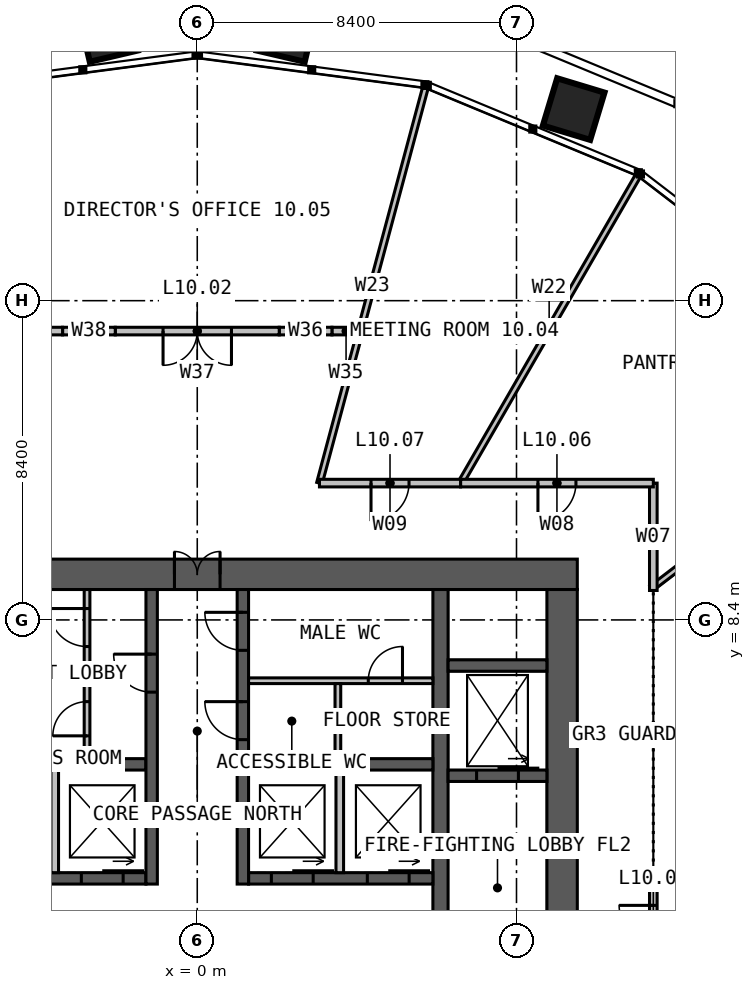
"""IFC4 building model, lengths in metres.
Left out: names, types, materials, properties, quantities, classifications, styles, units other than length and angle.
Written with IfcOpenShell. Run it as: python <this file> out.ifc"""

import sys

from ifc_helpers import new_model, si_unit, direction, frame, frame_2d, origin, place, context, subcontext, project, spatial, rectangle, extrude, element, fill, save


model = new_model("IFC4")
c1 = context("Model", 3, precision=1e-05, world=origin(), true_north=direction((0.0, 1.0)))
c2 = subcontext(c1, "Body", "Model", "MODEL_VIEW")
j1 = project(units=[si_unit("LENGTHUNIT", "METRE"), si_unit("PLANEANGLEUNIT", "RADIAN")], contexts=[c1])
p1 = place(None, origin())
s1 = spatial("IfcSite", under=j1, at=p1, CompositionType="ELEMENT")
p2 = place(p1, origin())
s2 = spatial("IfcBuilding", under=s1, at=p2, CompositionType="ELEMENT")
p3 = place(p2, frame((0.0, 0.0, 45.0)))
s3 = spatial("IfcBuildingStorey", under=s2, at=p3, CompositionType="ELEMENT", Elevation=45.0)
p4 = place(p3, frame((-10.0, 9.6, 0.0), z_axis=(0.0, 0.0, 1.0), x_axis=(1.0, 0.0, 0.0)))
e1 = element("IfcWall", 1, at=p4, inside=s3, PredefinedType="SOLIDWALL", context=c2, shape_type="SweptSolid", body=[
    extrude(rectangle(XDim=20.0, YDim=0.8, at=frame_2d((10.0, 0.0))), origin(), (0.0, 0.0, 1.0), 4.0),
])
p5 = place(p4, frame((9.4, 0.0, 0.0)))
e2 = element("IfcOpeningElement", 2, at=p5, cuts=e1, PredefinedType="OPENING", context=c2, shape_type="SweptSolid", body=[
    extrude(rectangle(XDim=1.2, YDim=2.2, at=frame_2d((0.6, 1.1))), frame((0.0, 0.41, 0.0), z_axis=(0.0, -1.0, 0.0), x_axis=(1.0, 0.0, 0.0)), (0.0, 0.0, 1.0), 0.82),
])
p6 = place(p3, frame((9.6, -9.2, 0.0), z_axis=(0.0, 0.0, 1.0), x_axis=(0.0, 1.0, 0.0)))
e3 = element("IfcWall", 3, at=p6, inside=s3, PredefinedType="SOLIDWALL", context=c2, shape_type="SweptSolid", body=[
    extrude(rectangle(XDim=18.4, YDim=0.8, at=frame_2d((9.2, 0.0))), origin(), (0.0, 0.0, 1.0), 4.0),
])
p7 = place(p3, frame((6.4, 9.2, 0.0), z_axis=(0.0, 0.0, 1.0), x_axis=(0.0, -1.0, 0.0)))
e4 = element("IfcWall", 4, at=p7, inside=s3, PredefinedType="SOLIDWALL", context=c2, shape_type="SweptSolid", body=[
    extrude(rectangle(XDim=18.4, YDim=0.4, at=frame_2d((9.2, 0.0))), origin(), (0.0, 0.0, 1.0), 4.0),
])
p8 = place(p7, frame((8.7, 0.0, 0.0)))
e5 = element("IfcOpeningElement", 5, at=p8, cuts=e4, PredefinedType="OPENING", context=c2, shape_type="SweptSolid", body=[
    extrude(rectangle(XDim=1.0, YDim=2.2, at=frame_2d((0.5, 1.1))), frame((0.0, 0.21, 0.0), z_axis=(0.0, -1.0, 0.0), x_axis=(1.0, 0.0, 0.0)), (0.0, 0.0, 1.0), 0.42),
])
p9 = place(p3, frame((-6.2, 1.6, 0.0), z_axis=(0.0, 0.0, 1.0), x_axis=(1.0, 0.0, 0.0)))
e6 = element("IfcWall", 6, at=p9, inside=s3, PredefinedType="SOLIDWALL", context=c2, shape_type="SweptSolid", body=[
    extrude(rectangle(XDim=4.85, YDim=0.3, at=frame_2d((2.425, 0.0))), origin(), (0.0, 0.0, 1.0), 4.0),
])
p10 = place(p9, frame((0.625, 0.0, 0.0)))
e7 = element("IfcOpeningElement", 7, at=p10, cuts=e6, PredefinedType="OPENING", context=c2, shape_type="SweptSolid", body=[
    extrude(rectangle(XDim=1.1, YDim=2.2, at=frame_2d((0.55, 1.1))), frame((0.0, 0.16, 0.0), z_axis=(0.0, -1.0, 0.0), x_axis=(1.0, 0.0, 0.0)), (0.0, 0.0, 1.0), 0.32),
])
p11 = place(p9, frame((3.15, 0.0, 0.0)))
e8 = element("IfcOpeningElement", 8, at=p11, cuts=e6, PredefinedType="OPENING", context=c2, shape_type="SweptSolid", body=[
    extrude(rectangle(XDim=1.1, YDim=2.2, at=frame_2d((0.55, 1.1))), frame((0.0, 0.16, 0.0), z_axis=(0.0, -1.0, 0.0), x_axis=(1.0, 0.0, 0.0)), (0.0, 0.0, 1.0), 0.32),
])
p12 = place(p3, frame((1.35, 1.6, 0.0), z_axis=(0.0, 0.0, 1.0), x_axis=(1.0, 0.0, 0.0)))
e9 = element("IfcWall", 9, at=p12, inside=s3, PredefinedType="SOLIDWALL", context=c2, shape_type="SweptSolid", body=[
    extrude(rectangle(XDim=4.85, YDim=0.3, at=frame_2d((2.425, 0.0))), origin(), (0.0, 0.0, 1.0), 4.0),
])
p13 = place(p12, frame((0.6, 0.0, 0.0)))
e10 = element("IfcOpeningElement", 10, at=p13, cuts=e9, PredefinedType="OPENING", context=c2, shape_type="SweptSolid", body=[
    extrude(rectangle(XDim=1.1, YDim=2.2, at=frame_2d((0.55, 1.1))), frame((0.0, 0.16, 0.0), z_axis=(0.0, -1.0, 0.0), x_axis=(1.0, 0.0, 0.0)), (0.0, 0.0, 1.0), 0.32),
])
p14 = place(p12, frame((3.125, 0.0, 0.0)))
e11 = element("IfcOpeningElement", 11, at=p14, cuts=e9, PredefinedType="OPENING", context=c2, shape_type="SweptSolid", body=[
    extrude(rectangle(XDim=1.1, YDim=2.2, at=frame_2d((0.55, 1.1))), frame((0.0, 0.16, 0.0), z_axis=(0.0, -1.0, 0.0), x_axis=(1.0, 0.0, 0.0)), (0.0, 0.0, 1.0), 0.32),
])
for number, where, z_axis, x_axis in (
    (12, (-6.2, 4.6, 0.0), (0.0, 0.0, 1.0), (1.0, 0.0, 0.0)),
    (13, (1.35, 4.6, 0.0), (0.0, 0.0, 1.0), (1.0, 0.0, 0.0)),
):
    element("IfcWall", number, at=place(p3, frame(where, z_axis=z_axis, x_axis=x_axis)), inside=s3, PredefinedType="SOLIDWALL", context=c2, shape_type="SweptSolid", body=[
        extrude(rectangle(XDim=4.85, YDim=0.3, at=frame_2d((2.425, 0.0))), origin(), (0.0, 0.0, 1.0), 4.0),
    ])
p15 = place(p3, frame((-1.2, 1.45, 0.0), z_axis=(0.0, 0.0, 1.0), x_axis=(0.0, 1.0, 0.0)))
e14 = element("IfcWall", 14, at=p15, inside=s3, PredefinedType="SOLIDWALL", context=c2, shape_type="SweptSolid", body=[
    extrude(rectangle(XDim=7.75, YDim=0.3, at=frame_2d((3.875, 0.0))), origin(), (0.0, 0.0, 1.0), 4.0),
])
p16 = place(p15, frame((5.05, 0.0, 0.0)))
e15 = element("IfcOpeningElement", 15, at=p16, cuts=e14, PredefinedType="OPENING", context=c2, shape_type="SweptSolid", body=[
    extrude(rectangle(XDim=1.0, YDim=2.2, at=frame_2d((0.5, 1.1))), frame((0.0, 0.16, 0.0), z_axis=(0.0, -1.0, 0.0), x_axis=(1.0, 0.0, 0.0)), (0.0, 0.0, 1.0), 0.32),
])
p17 = place(p3, frame((1.2, 1.45, 0.0), z_axis=(0.0, 0.0, 1.0), x_axis=(0.0, 1.0, 0.0)))
e16 = element("IfcWall", 16, at=p17, inside=s3, PredefinedType="SOLIDWALL", context=c2, shape_type="SweptSolid", body=[
    extrude(rectangle(XDim=7.75, YDim=0.3, at=frame_2d((3.875, 0.0))), origin(), (0.0, 0.0, 1.0), 4.0),
])
p18 = place(p17, frame((3.8, 0.0, 0.0)))
e17 = element("IfcOpeningElement", 17, at=p18, cuts=e16, PredefinedType="OPENING", context=c2, shape_type="SweptSolid", body=[
    extrude(rectangle(XDim=1.0, YDim=2.2, at=frame_2d((0.5, 1.1))), frame((0.0, 0.16, 0.0), z_axis=(0.0, -1.0, 0.0), x_axis=(1.0, 0.0, 0.0)), (0.0, 0.0, 1.0), 0.32),
])
p19 = place(p17, frame((6.15, 0.0, 0.0)))
e18 = element("IfcOpeningElement", 18, at=p19, cuts=e16, PredefinedType="OPENING", context=c2, shape_type="SweptSolid", body=[
    extrude(rectangle(XDim=1.0, YDim=2.2, at=frame_2d((0.5, 1.1))), frame((0.0, 0.16, 0.0), z_axis=(0.0, -1.0, 0.0), x_axis=(1.0, 0.0, 0.0)), (0.0, 0.0, 1.0), 0.32),
])
p20 = place(p3, frame((6.6, 4.3, 0.0), z_axis=(0.0, 0.0, 1.0), x_axis=(1.0, 0.0, 0.0)))
e19 = element("IfcWall", 19, at=p20, inside=s3, PredefinedType="SOLIDWALL", context=c2, shape_type="SweptSolid", body=[
    extrude(rectangle(XDim=2.6, YDim=0.3, at=frame_2d((1.3, 0.0))), origin(), (0.0, 0.0, 1.0), 4.0),
])
p21 = place(p20, frame((0.75, 0.0, 0.0)))
e20 = element("IfcOpeningElement", 20, at=p21, cuts=e19, PredefinedType="OPENING", context=c2, shape_type="SweptSolid", body=[
    extrude(rectangle(XDim=1.1, YDim=2.2, at=frame_2d((0.55, 1.1))), frame((0.0, 0.16, 0.0), z_axis=(0.0, -1.0, 0.0), x_axis=(1.0, 0.0, 0.0)), (0.0, 0.0, 1.0), 0.32),
])
p22 = place(p3, frame((6.6, 7.2, 0.0), z_axis=(0.0, 0.0, 1.0), x_axis=(1.0, 0.0, 0.0)))
e21 = element("IfcWall", 21, at=p22, inside=s3, PredefinedType="SOLIDWALL", context=c2, shape_type="SweptSolid", body=[
    extrude(rectangle(XDim=2.6, YDim=0.3, at=frame_2d((1.3, 0.0))), origin(), (0.0, 0.0, 1.0), 4.0),
])
for number, where, z_axis, x_axis in (
    (22, (-3.75, 1.75, 0.0), (0.0, 0.0, 1.0), (0.0, 1.0, 0.0)),
    (23, (3.75, 1.75, 0.0), (0.0, 0.0, 1.0), (0.0, 1.0, 0.0)),
):
    element("IfcWall", number, at=place(p3, frame(where, z_axis=z_axis, x_axis=x_axis)), inside=s3, PredefinedType="SOLIDWALL", context=c2, shape_type="SweptSolid", body=[
        extrude(rectangle(XDim=2.7, YDim=0.2, at=frame_2d((1.35, 0.0))), origin(), (0.0, 0.0, 1.0), 3.75),
    ])
p23 = place(p3, frame((1.35, 6.8, 0.0), z_axis=(0.0, 0.0, 1.0), x_axis=(1.0, 0.0, 0.0)))
e24 = element("IfcWall", 24, at=p23, inside=s3, PredefinedType="PARTITIONING", context=c2, shape_type="SweptSolid", body=[
    extrude(rectangle(XDim=4.85, YDim=0.15, at=frame_2d((2.425, 0.0))), origin(), (0.0, 0.0, 1.0), 3.75),
])
p24 = place(p23, frame((3.15, 0.0, 0.0)))
e25 = element("IfcOpeningElement", 25, at=p24, cuts=e24, PredefinedType="OPENING", context=c2, shape_type="SweptSolid", body=[
    extrude(rectangle(XDim=0.9, YDim=2.2, at=frame_2d((0.45, 1.1))), frame((0.0, 0.085, 0.0), z_axis=(0.0, -1.0, 0.0), x_axis=(1.0, 0.0, 0.0)), (0.0, 0.0, 1.0), 0.17),
])
p25 = place(p3, frame((3.7, 4.75, 0.0), z_axis=(0.0, 0.0, 1.0), x_axis=(0.0, 1.0, 0.0)))
e26 = element("IfcWall", 26, at=p25, inside=s3, PredefinedType="PARTITIONING", context=c2, shape_type="SweptSolid", body=[
    extrude(rectangle(XDim=1.975, YDim=0.15, at=frame_2d((0.988, 0.0))), origin(), (0.0, 0.0, 1.0), 3.75),
])
p26 = place(p3, frame((-2.9, 4.75, 0.0), z_axis=(0.0, 0.0, 1.0), x_axis=(0.0, 1.0, 0.0)))
e27 = element("IfcWall", 27, at=p26, inside=s3, PredefinedType="PARTITIONING", context=c2, shape_type="SweptSolid", body=[
    extrude(rectangle(XDim=4.45, YDim=0.15, at=frame_2d((2.225, 0.0))), origin(), (0.0, 0.0, 1.0), 3.75),
])
p27 = place(p26, frame((2.95, 0.0, 0.0)))
e28 = element("IfcOpeningElement", 28, at=p27, cuts=e27, PredefinedType="OPENING", context=c2, shape_type="SweptSolid", body=[
    extrude(rectangle(XDim=1.0, YDim=2.2, at=frame_2d((0.5, 1.1))), frame((0.0, 0.085, 0.0), z_axis=(0.0, -1.0, 0.0), x_axis=(1.0, 0.0, 0.0)), (0.0, 0.0, 1.0), 0.17),
])
p28 = place(p26, frame((0.6, 0.0, 0.0)))
e29 = element("IfcOpeningElement", 29, at=p28, cuts=e27, PredefinedType="OPENING", context=c2, shape_type="SweptSolid", body=[
    extrude(rectangle(XDim=0.9, YDim=2.2, at=frame_2d((0.45, 1.1))), frame((0.0, 0.085, 0.0), z_axis=(0.0, -1.0, 0.0), x_axis=(1.0, 0.0, 0.0)), (0.0, 0.0, 1.0), 0.17),
])
p29 = place(p3, frame((-6.2, 7.0, 0.0), z_axis=(0.0, 0.0, 1.0), x_axis=(1.0, 0.0, 0.0)))
e30 = element("IfcWall", 30, at=p29, inside=s3, PredefinedType="PARTITIONING", context=c2, shape_type="SweptSolid", body=[
    extrude(rectangle(XDim=3.225, YDim=0.15, at=frame_2d((1.612, 0.0))), origin(), (0.0, 0.0, 1.0), 3.75),
])
p30 = place(p3, frame((12.01, 1.484, 0.0), z_axis=(0.0, 0.0, 1.0), x_axis=(0.991668835428, 0.128813511872, 0.0)))
e31 = element("IfcWall", 31, at=p30, inside=s3, PredefinedType="PARTITIONING", context=c2, shape_type="SweptSolid", body=[
    extrude(rectangle(XDim=10.881, YDim=0.15, at=frame_2d((5.44, 0.0))), origin(), (0.0, 0.0, 1.0), 2.79),
])
p31 = place(p3, frame((11.954, 9.235, 0.0), z_axis=(0.0, 0.0, 1.0), x_axis=(0.794412378412, 0.607378772288, 0.0)))
e32 = element("IfcWall", 32, at=p31, inside=s3, PredefinedType="PARTITIONING", context=c2, shape_type="SweptSolid", body=[
    extrude(rectangle(XDim=7.876, YDim=0.15, at=frame_2d((3.938, 0.0))), origin(), (0.0, 0.0, 1.0), 2.79),
])
p32 = place(p3, frame((6.928, 12.0, 0.0), z_axis=(0.0, 0.0, 1.0), x_axis=(0.499994446179, 0.866028610261, 0.0)))
e33 = element("IfcWall", 33, at=p32, inside=s3, PredefinedType="PARTITIONING", context=c2, shape_type="SweptSolid", body=[
    extrude(rectangle(XDim=9.324, YDim=0.15, at=frame_2d((4.662, 0.0))), origin(), (0.0, 0.0, 1.0), 2.79),
])
p33 = place(p3, frame((3.215, 12.0, 0.0), z_axis=(0.0, 0.0, 1.0), x_axis=(0.258826463373, 0.965923838539, 0.0)))
e34 = element("IfcWall", 34, at=p33, inside=s3, PredefinedType="PARTITIONING", context=c2, shape_type="SweptSolid", body=[
    extrude(rectangle(XDim=10.757, YDim=0.15, at=frame_2d((5.378, 0.0))), origin(), (0.0, 0.0, 1.0), 2.79),
])
p34 = place(p3, frame((12.0, -1.58, 0.0), z_axis=(0.0, 0.0, 1.0), x_axis=(0.0, 1.0, 0.0)))
e35 = element("IfcWall", 35, at=p34, inside=s3, PredefinedType="PARTITIONING", context=c2, shape_type="SweptSolid", body=[
    extrude(rectangle(XDim=3.139, YDim=0.2, at=frame_2d((1.569, 0.0))), origin(), (0.0, 0.0, 1.0), 3.8),
])
p35 = place(p34, frame((0.669, 0.0, 0.0)))
e36 = element("IfcOpeningElement", 36, at=p35, cuts=e35, PredefinedType="OPENING", context=c2, shape_type="SweptSolid", body=[
    extrude(rectangle(XDim=1.8, YDim=2.2, at=frame_2d((0.9, 1.1))), frame((0.0, 0.11, 0.0), z_axis=(0.0, -1.0, 0.0), x_axis=(1.0, 0.0, 0.0)), (0.0, 0.0, 1.0), 0.22),
])
p36 = place(p3, frame((12.0, 9.175, 0.0), z_axis=(0.0, 0.0, 1.0), x_axis=(0.0, 1.0, 0.0)))
e37 = element("IfcWall", 37, at=p36, inside=s3, PredefinedType="PARTITIONING", context=c2, shape_type="SweptSolid", body=[
    extrude(rectangle(XDim=2.825, YDim=0.2, at=frame_2d((1.413, 0.0))), origin(), (0.0, 0.0, 1.0), 3.8),
])
p37 = place(p3, frame((12.0, 12.0, 0.0), z_axis=(0.0, 0.0, 1.0), x_axis=(-1.0, 0.0, 0.0)))
e38 = element("IfcWall", 38, at=p37, inside=s3, PredefinedType="PARTITIONING", context=c2, shape_type="SweptSolid", body=[
    extrude(rectangle(XDim=5.072, YDim=0.2, at=frame_2d((2.536, 0.0))), origin(), (0.0, 0.0, 1.0), 3.8),
])
p38 = place(p37, frame((2.036, 0.0, 0.0)))
e39 = element("IfcOpeningElement", 39, at=p38, cuts=e38, PredefinedType="OPENING", context=c2, shape_type="SweptSolid", body=[
    extrude(rectangle(XDim=1.0, YDim=2.2, at=frame_2d((0.5, 1.1))), frame((0.0, 0.11, 0.0), z_axis=(0.0, -1.0, 0.0), x_axis=(1.0, 0.0, 0.0)), (0.0, 0.0, 1.0), 0.22),
])
p39 = place(p3, frame((6.928, 12.0, 0.0), z_axis=(0.0, 0.0, 1.0), x_axis=(-1.0, 0.0, 0.0)))
e40 = element("IfcWall", 40, at=p39, inside=s3, PredefinedType="PARTITIONING", context=c2, shape_type="SweptSolid", body=[
    extrude(rectangle(XDim=3.713, YDim=0.2, at=frame_2d((1.856, 0.0))), origin(), (0.0, 0.0, 1.0), 3.8),
])
p40 = place(p39, frame((1.356, 0.0, 0.0)))
e41 = element("IfcOpeningElement", 41, at=p40, cuts=e40, PredefinedType="OPENING", context=c2, shape_type="SweptSolid", body=[
    extrude(rectangle(XDim=1.0, YDim=2.2, at=frame_2d((0.5, 1.1))), frame((0.0, 0.11, 0.0), z_axis=(0.0, -1.0, 0.0), x_axis=(1.0, 0.0, 0.0)), (0.0, 0.0, 1.0), 0.22),
])
p41 = place(p3, frame((4.287, 16.0, 0.0), z_axis=(0.0, 0.0, 1.0), x_axis=(-1.0, 0.0, 0.0)))
e42 = element("IfcWall", 42, at=p41, inside=s3, PredefinedType="PARTITIONING", context=c2, shape_type="SweptSolid", body=[
    extrude(rectangle(XDim=0.743, YDim=0.2, at=frame_2d((0.372, 0.0))), origin(), (0.0, 0.0, 1.0), 3.8),
])
p42 = place(p3, frame((3.544, 16.0, 0.0), z_axis=(0.0, 0.0, 1.0), x_axis=(-1.0, 0.0, 0.0)))
e43 = element("IfcWall", 43, at=p42, inside=s3, PredefinedType="PARTITIONING", context=c2, shape_type="SweptSolid", body=[
    extrude(rectangle(XDim=1.387, YDim=0.2, at=frame_2d((0.693, 0.0))), origin(), (0.0, 0.0, 1.0), 3.4),
])
p43 = place(p3, frame((2.157, 16.0, 0.0), z_axis=(0.0, 0.0, 1.0), x_axis=(-1.0, 0.0, 0.0)))
e44 = element("IfcWall", 44, at=p43, inside=s3, PredefinedType="PARTITIONING", context=c2, shape_type="SweptSolid", body=[
    extrude(rectangle(XDim=4.314, YDim=0.2, at=frame_2d((2.157, 0.0))), origin(), (0.0, 0.0, 1.0), 3.8),
])
p44 = place(p43, frame((1.257, 0.0, 0.0)))
e45 = element("IfcOpeningElement", 45, at=p44, cuts=e44, PredefinedType="OPENING", context=c2, shape_type="SweptSolid", body=[
    extrude(rectangle(XDim=1.8, YDim=2.2, at=frame_2d((0.9, 1.1))), frame((0.0, 0.11, 0.0), z_axis=(0.0, -1.0, 0.0), x_axis=(1.0, 0.0, 0.0)), (0.0, 0.0, 1.0), 0.22),
])
p45 = place(p3, frame((-2.157, 16.0, 0.0), z_axis=(0.0, 0.0, 1.0), x_axis=(-1.0, 0.0, 0.0)))
e46 = element("IfcWall", 46, at=p45, inside=s3, PredefinedType="PARTITIONING", context=c2, shape_type="SweptSolid", body=[
    extrude(rectangle(XDim=1.387, YDim=0.2, at=frame_2d((0.693, 0.0))), origin(), (0.0, 0.0, 1.0), 3.4),
])
p46 = place(p3, frame((-3.544, 16.0, 0.0), z_axis=(0.0, 0.0, 1.0), x_axis=(-1.0, 0.0, 0.0)))
e47 = element("IfcWall", 47, at=p46, inside=s3, PredefinedType="PARTITIONING", context=c2, shape_type="SweptSolid", body=[
    extrude(rectangle(XDim=5.694, YDim=0.2, at=frame_2d((2.847, 0.0))), origin(), (0.0, 0.0, 1.0), 3.8),
])
p47 = place(p46, frame((2.719, 0.0, 0.0)))
e48 = element("IfcOpeningElement", 48, at=p47, cuts=e47, PredefinedType="OPENING", context=c2, shape_type="SweptSolid", body=[
    extrude(rectangle(XDim=1.0, YDim=2.2, at=frame_2d((0.5, 1.1))), frame((0.0, 0.11, 0.0), z_axis=(0.0, -1.0, 0.0), x_axis=(1.0, 0.0, 0.0)), (0.0, 0.0, 1.0), 0.22),
])
p48 = place(p5, origin())
e49 = element("IfcDoor", 49, at=p48, inside=s3, OperationType="DOUBLE_DOOR_SINGLE_SWING", PredefinedType="DOOR", context=c2, shape_type="SweptSolid", body=[
    extrude(rectangle(XDim=1.2, YDim=2.2, at=frame_2d((0.6, 1.1))), frame((0.0, 0.025, 0.0), z_axis=(0.0, -1.0, 0.0), x_axis=(1.0, 0.0, 0.0)), (0.0, 0.0, 1.0), 0.05),
])
fill(e2, e49)
p49 = place(p16, origin())
e50 = element("IfcDoor", 50, at=p49, inside=s3, OperationType="SINGLE_SWING_RIGHT", PredefinedType="DOOR", context=c2, shape_type="SweptSolid", body=[
    extrude(rectangle(XDim=1.0, YDim=2.2, at=frame_2d((0.5, 1.1))), frame((0.0, 0.025, 0.0), z_axis=(0.0, -1.0, 0.0), x_axis=(1.0, 0.0, 0.0)), (0.0, 0.0, 1.0), 0.05),
])
fill(e15, e50)
p50 = place(p18, origin())
e51 = element("IfcDoor", 51, at=p50, inside=s3, OperationType="SINGLE_SWING_RIGHT", PredefinedType="DOOR", context=c2, shape_type="SweptSolid", body=[
    extrude(rectangle(XDim=1.0, YDim=2.2, at=frame_2d((0.5, 1.1))), frame((0.0, 0.025, 0.0), z_axis=(0.0, -1.0, 0.0), x_axis=(1.0, 0.0, 0.0)), (0.0, 0.0, 1.0), 0.05),
])
fill(e17, e51)
p51 = place(p19, origin())
e52 = element("IfcDoor", 52, at=p51, inside=s3, OperationType="SINGLE_SWING_RIGHT", PredefinedType="DOOR", context=c2, shape_type="SweptSolid", body=[
    extrude(rectangle(XDim=1.0, YDim=2.2, at=frame_2d((0.5, 1.1))), frame((0.0, 0.025, 0.0), z_axis=(0.0, -1.0, 0.0), x_axis=(1.0, 0.0, 0.0)), (0.0, 0.0, 1.0), 0.05),
])
fill(e18, e52)
p52 = place(p24, origin())
e53 = element("IfcDoor", 53, at=p52, inside=s3, OperationType="SINGLE_SWING_RIGHT", PredefinedType="DOOR", context=c2, shape_type="SweptSolid", body=[
    extrude(rectangle(XDim=0.9, YDim=2.2, at=frame_2d((0.45, 1.1))), frame((0.0, 0.025, 0.0), z_axis=(0.0, -1.0, 0.0), x_axis=(1.0, 0.0, 0.0)), (0.0, 0.0, 1.0), 0.05),
])
fill(e25, e53)
p53 = place(p27, origin())
e54 = element("IfcDoor", 54, at=p53, inside=s3, OperationType="SINGLE_SWING_RIGHT", PredefinedType="DOOR", context=c2, shape_type="SweptSolid", body=[
    extrude(rectangle(XDim=1.0, YDim=2.2, at=frame_2d((0.5, 1.1))), frame((0.0, 0.025, 0.0), z_axis=(0.0, -1.0, 0.0), x_axis=(1.0, 0.0, 0.0)), (0.0, 0.0, 1.0), 0.05),
])
fill(e28, e54)
p54 = place(p28, origin())
e55 = element("IfcDoor", 55, at=p54, inside=s3, OperationType="SINGLE_SWING_LEFT", PredefinedType="DOOR", context=c2, shape_type="SweptSolid", body=[
    extrude(rectangle(XDim=0.9, YDim=2.2, at=frame_2d((0.45, 1.1))), frame((0.0, 0.025, 0.0), z_axis=(0.0, -1.0, 0.0), x_axis=(1.0, 0.0, 0.0)), (0.0, 0.0, 1.0), 0.05),
])
fill(e29, e55)
p55 = place(p11, origin())
e56 = element("IfcDoor", 56, at=p55, inside=s3, OperationType="SLIDING_TO_LEFT", PredefinedType="DOOR", context=c2, shape_type="SweptSolid", body=[
    extrude(rectangle(XDim=1.1, YDim=2.2, at=frame_2d((0.55, 1.1))), frame((0.0, 0.025, 0.0), z_axis=(0.0, -1.0, 0.0), x_axis=(1.0, 0.0, 0.0)), (0.0, 0.0, 1.0), 0.05),
])
fill(e8, e56)
p56 = place(p13, origin())
e57 = element("IfcDoor", 57, at=p56, inside=s3, OperationType="SLIDING_TO_LEFT", PredefinedType="DOOR", context=c2, shape_type="SweptSolid", body=[
    extrude(rectangle(XDim=1.1, YDim=2.2, at=frame_2d((0.55, 1.1))), frame((0.0, 0.025, 0.0), z_axis=(0.0, -1.0, 0.0), x_axis=(1.0, 0.0, 0.0)), (0.0, 0.0, 1.0), 0.05),
])
fill(e10, e57)
p57 = place(p14, origin())
e58 = element("IfcDoor", 58, at=p57, inside=s3, OperationType="SLIDING_TO_LEFT", PredefinedType="DOOR", context=c2, shape_type="SweptSolid", body=[
    extrude(rectangle(XDim=1.1, YDim=2.2, at=frame_2d((0.55, 1.1))), frame((0.0, 0.025, 0.0), z_axis=(0.0, -1.0, 0.0), x_axis=(1.0, 0.0, 0.0)), (0.0, 0.0, 1.0), 0.05),
])
fill(e11, e58)
p58 = place(p21, origin())
e59 = element("IfcDoor", 59, at=p58, inside=s3, OperationType="SLIDING_TO_LEFT", PredefinedType="DOOR", context=c2, shape_type="SweptSolid", body=[
    extrude(rectangle(XDim=1.1, YDim=2.2, at=frame_2d((0.55, 1.1))), frame((0.0, 0.025, 0.0), z_axis=(0.0, -1.0, 0.0), x_axis=(1.0, 0.0, 0.0)), (0.0, 0.0, 1.0), 0.05),
])
fill(e20, e59)
p59 = place(p35, origin())
e60 = element("IfcDoor", 60, at=p59, inside=s3, OperationType="DOUBLE_DOOR_SINGLE_SWING", PredefinedType="DOOR", context=c2, shape_type="SweptSolid", body=[
    extrude(rectangle(XDim=1.8, YDim=2.2, at=frame_2d((0.9, 1.1))), frame((0.0, 0.025, 0.0), z_axis=(0.0, -1.0, 0.0), x_axis=(1.0, 0.0, 0.0)), (0.0, 0.0, 1.0), 0.05),
])
fill(e36, e60)
p60 = place(p38, origin())
e61 = element("IfcDoor", 61, at=p60, inside=s3, OperationType="SINGLE_SWING_RIGHT", PredefinedType="DOOR", context=c2, shape_type="SweptSolid", body=[
    extrude(rectangle(XDim=1.0, YDim=2.2, at=frame_2d((0.5, 1.1))), frame((0.0, 0.025, 0.0), z_axis=(0.0, -1.0, 0.0), x_axis=(1.0, 0.0, 0.0)), (0.0, 0.0, 1.0), 0.05),
])
fill(e39, e61)
p61 = place(p40, origin())
e62 = element("IfcDoor", 62, at=p61, inside=s3, OperationType="SINGLE_SWING_RIGHT", PredefinedType="DOOR", context=c2, shape_type="SweptSolid", body=[
    extrude(rectangle(XDim=1.0, YDim=2.2, at=frame_2d((0.5, 1.1))), frame((0.0, 0.025, 0.0), z_axis=(0.0, -1.0, 0.0), x_axis=(1.0, 0.0, 0.0)), (0.0, 0.0, 1.0), 0.05),
])
fill(e41, e62)
p62 = place(p44, origin())
e63 = element("IfcDoor", 63, at=p62, inside=s3, OperationType="DOUBLE_DOOR_SINGLE_SWING", PredefinedType="DOOR", context=c2, shape_type="SweptSolid", body=[
    extrude(rectangle(XDim=1.8, YDim=2.2, at=frame_2d((0.9, 1.1))), frame((0.0, 0.025, 0.0), z_axis=(0.0, -1.0, 0.0), x_axis=(1.0, 0.0, 0.0)), (0.0, 0.0, 1.0), 0.05),
])
fill(e45, e63)
save(model, sys.argv[1])
